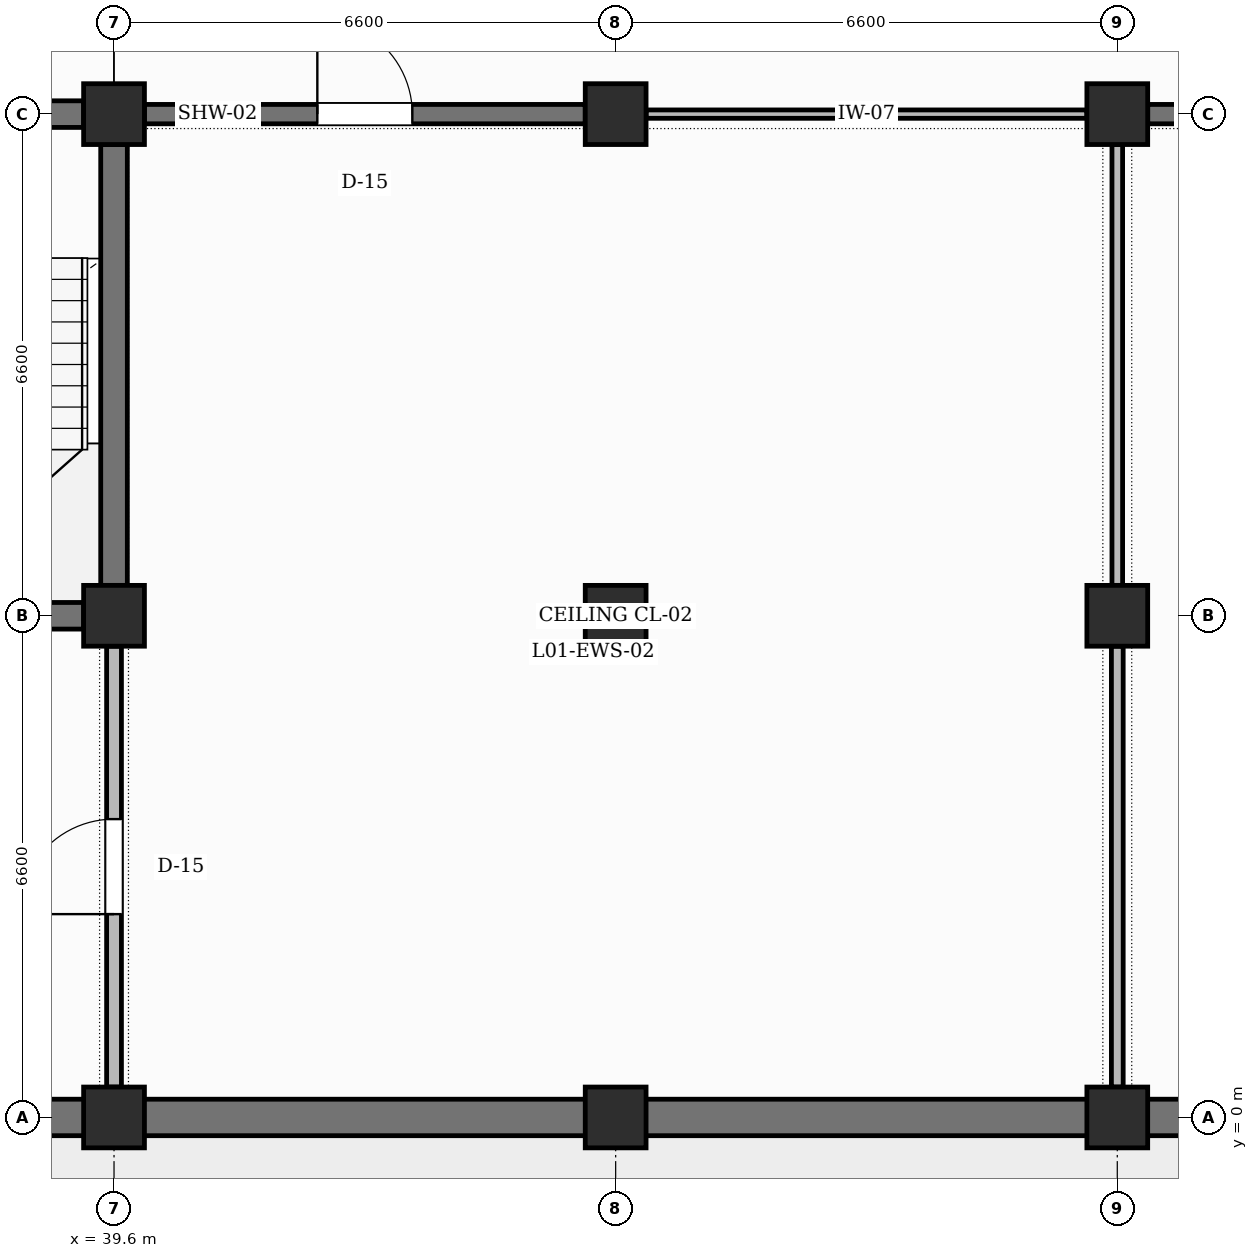
"""IFC4 building model, lengths in metres.
Left out: names, types, materials, properties, quantities, classifications, styles, units other than length and angle.
Written with IfcOpenShell. Run it as: python <this file> out.ifc"""

import sys

from ifc_helpers import new_model, si_unit, direction, frame, frame_2d, origin, origin_2d, place, context, subcontext, project, spatial, rectangle, extrude, element, fill, save


model = new_model("IFC4")
c1 = context("Model", 3, precision=1e-05, world=origin(), true_north=direction((0.0, 1.0)))
c2 = subcontext(c1, "Body", "Model", "MODEL_VIEW")
j1 = project(units=[si_unit("LENGTHUNIT", "METRE"), si_unit("PLANEANGLEUNIT", "RADIAN")], contexts=[c1])
p1 = place(None, origin())
s1 = spatial("IfcSite", under=j1, at=p1, CompositionType="ELEMENT")
p2 = place(p1, origin())
s2 = spatial("IfcBuilding", under=s1, at=p2, CompositionType="ELEMENT")
p3 = place(p2, frame((0.0, 0.0, 5.4)))
s3 = spatial("IfcBuildingStorey", under=s2, at=p3, CompositionType="ELEMENT", Elevation=5.4)
for number, where, z_axis, x_axis in (
    (1, (39.6, 0.0, 0.0), (0.0, 0.0, 1.0), (1.0, 0.0, 0.0)),
    (2, (39.6, 6.6, 0.0), (0.0, 0.0, 1.0), (1.0, 0.0, 0.0)),
    (3, (39.6, 13.2, 0.0), (0.0, 0.0, 1.0), (1.0, 0.0, 0.0)),
    (4, (46.2, 0.0, 0.0), (0.0, 0.0, 1.0), (1.0, 0.0, 0.0)),
    (5, (46.2, 6.6, 0.0), (0.0, 0.0, 1.0), (1.0, 0.0, 0.0)),
    (6, (46.2, 13.2, 0.0), (0.0, 0.0, 1.0), (1.0, 0.0, 0.0)),
    (7, (52.8, 0.0, 0.0), (0.0, 0.0, 1.0), (1.0, 0.0, 0.0)),
    (8, (52.8, 6.6, 0.0), (0.0, 0.0, 1.0), (1.0, 0.0, 0.0)),
    (9, (52.8, 13.2, 0.0), (0.0, 0.0, 1.0), (1.0, 0.0, 0.0)),
):
    element("IfcColumn", number, at=place(p3, frame(where, z_axis=z_axis, x_axis=x_axis)), inside=s3, PredefinedType="COLUMN", context=c2, shape_type="SweptSolid", body=[
        extrude(rectangle(XDim=0.8, YDim=0.8, at=origin_2d()), origin(), (0.0, 0.0, 1.0), 4.8),
    ])
p4 = place(p3, frame((33.425, 0.0, 0.0), z_axis=(0.0, 0.0, 1.0), x_axis=(1.0, 0.0, 0.0)))
e10 = element("IfcWall", 10, at=p4, inside=s3, PredefinedType="SOLIDWALL", context=c2, shape_type="SweptSolid", body=[
    extrude(rectangle(XDim=5.775, YDim=0.48, at=frame_2d((2.887, 0.0))), origin(), (0.0, 0.0, 1.0), 3.85),
])
p5 = place(p3, frame((40.0, 0.0, 0.0), z_axis=(0.0, 0.0, 1.0), x_axis=(1.0, 0.0, 0.0)))
e11 = element("IfcWall", 11, at=p5, inside=s3, PredefinedType="SOLIDWALL", context=c2, shape_type="SweptSolid", body=[
    extrude(rectangle(XDim=5.8, YDim=0.48, at=frame_2d((2.9, 0.0))), origin(), (0.0, 0.0, 1.0), 3.85),
])
p6 = place(p3, frame((46.6, 0.0, 0.0), z_axis=(0.0, 0.0, 1.0), x_axis=(1.0, 0.0, 0.0)))
e12 = element("IfcWall", 12, at=p6, inside=s3, PredefinedType="SOLIDWALL", context=c2, shape_type="SweptSolid", body=[
    extrude(rectangle(XDim=5.8, YDim=0.48, at=frame_2d((2.9, 0.0))), origin(), (0.0, 0.0, 1.0), 3.85),
])
p7 = place(p3, frame((53.2, 0.0, 0.0), z_axis=(0.0, 0.0, 1.0), x_axis=(1.0, 0.0, 0.0)))
e13 = element("IfcWall", 13, at=p7, inside=s3, PredefinedType="SOLIDWALL", context=c2, shape_type="SweptSolid", body=[
    extrude(rectangle(XDim=5.8, YDim=0.48, at=frame_2d((2.9, 0.0))), origin(), (0.0, 0.0, 1.0), 3.85),
])
p8 = place(p3, frame((33.425, 6.6, 0.0), z_axis=(0.0, 0.0, 1.0), x_axis=(1.0, 0.0, 0.0)))
e14 = element("IfcWall", 14, at=p8, inside=s3, PredefinedType="SHEAR", context=c2, shape_type="SweptSolid", body=[
    extrude(rectangle(XDim=5.775, YDim=0.35, at=frame_2d((2.887, 0.0))), origin(), (0.0, 0.0, 1.0), 3.6),
])
p9 = place(p3, frame((33.425, 13.2, 0.0), z_axis=(0.0, 0.0, 1.0), x_axis=(1.0, 0.0, 0.0)))
e15 = element("IfcWall", 15, at=p9, inside=s3, PredefinedType="SHEAR", context=c2, shape_type="SweptSolid", body=[
    extrude(rectangle(XDim=5.775, YDim=0.35, at=frame_2d((2.887, 0.0))), origin(), (0.0, 0.0, 1.0), 3.7),
])
p10 = place(p9, frame((2.337, 0.0, 0.0)))
e16 = element("IfcOpeningElement", 16, at=p10, cuts=e15, PredefinedType="OPENING", context=c2, shape_type="SweptSolid", body=[
    extrude(rectangle(XDim=1.1, YDim=2.15, at=frame_2d((0.55, 1.075))), frame((0.0, 0.185, 0.0), z_axis=(0.0, -1.0, 0.0), x_axis=(1.0, 0.0, 0.0)), (0.0, 0.0, 1.0), 0.37),
])
p11 = place(p3, frame((39.6, 7.0, 0.0), z_axis=(0.0, 0.0, 1.0), x_axis=(0.0, 1.0, 0.0)))
e17 = element("IfcWall", 17, at=p11, inside=s3, PredefinedType="SHEAR", context=c2, shape_type="SweptSolid", body=[
    extrude(rectangle(XDim=5.8, YDim=0.35, at=frame_2d((2.9, 0.0))), origin(), (0.0, 0.0, 1.0), 3.7),
])
p12 = place(p3, frame((39.6, 0.4, 0.0), z_axis=(0.0, 0.0, 1.0), x_axis=(0.0, 1.0, 0.0)))
e18 = element("IfcWall", 18, at=p12, inside=s3, PredefinedType="PARTITIONING", context=c2, shape_type="SweptSolid", body=[
    extrude(rectangle(XDim=5.8, YDim=0.195, at=frame_2d((2.9, 0.0))), origin(), (0.0, 0.0, 1.0), 3.7),
])
p13 = place(p12, frame((2.275, 0.0, 0.0)))
e19 = element("IfcOpeningElement", 19, at=p13, cuts=e18, PredefinedType="OPENING", context=c2, shape_type="SweptSolid", body=[
    extrude(rectangle(XDim=1.25, YDim=2.25, at=frame_2d((0.625, 1.125))), frame((0.0, 0.107, 0.0), z_axis=(0.0, -1.0, 0.0), x_axis=(1.0, 0.0, 0.0)), (0.0, 0.0, 1.0), 0.215),
])
p14 = place(p3, frame((40.0, 13.2, 0.0), z_axis=(0.0, 0.0, 1.0), x_axis=(1.0, 0.0, 0.0)))
e20 = element("IfcWall", 20, at=p14, inside=s3, PredefinedType="SHEAR", context=c2, shape_type="SweptSolid", body=[
    extrude(rectangle(XDim=5.8, YDim=0.255, at=frame_2d((2.9, 0.0))), origin(), (0.0, 0.0, 1.0), 3.6),
])
p15 = place(p14, frame((2.275, 0.0, 0.0)))
e21 = element("IfcOpeningElement", 21, at=p15, cuts=e20, PredefinedType="OPENING", context=c2, shape_type="SweptSolid", body=[
    extrude(rectangle(XDim=1.25, YDim=2.25, at=frame_2d((0.625, 1.125))), frame((0.0, 0.137, 0.0), z_axis=(0.0, -1.0, 0.0), x_axis=(1.0, 0.0, 0.0)), (0.0, 0.0, 1.0), 0.275),
])
p16 = place(p3, frame((52.8, 0.4, 0.0), z_axis=(0.0, 0.0, 1.0), x_axis=(0.0, 1.0, 0.0)))
e22 = element("IfcWall", 22, at=p16, inside=s3, PredefinedType="PARTITIONING", context=c2, shape_type="SweptSolid", body=[
    extrude(rectangle(XDim=5.8, YDim=0.155, at=frame_2d((2.9, 0.0))), origin(), (0.0, 0.0, 1.0), 3.7),
])
p17 = place(p3, frame((52.8, 7.0, 0.0), z_axis=(0.0, 0.0, 1.0), x_axis=(0.0, 1.0, 0.0)))
e23 = element("IfcWall", 23, at=p17, inside=s3, PredefinedType="PARTITIONING", context=c2, shape_type="SweptSolid", body=[
    extrude(rectangle(XDim=5.8, YDim=0.14, at=frame_2d((2.9, 0.0))), origin(), (0.0, 0.0, 1.0), 3.7),
])
p18 = place(p3, frame((46.6, 13.2, 0.0), z_axis=(0.0, 0.0, 1.0), x_axis=(1.0, 0.0, 0.0)))
e24 = element("IfcWall", 24, at=p18, inside=s3, PredefinedType="PARTITIONING", context=c2, shape_type="SweptSolid", body=[
    extrude(rectangle(XDim=5.8, YDim=0.11, at=frame_2d((2.9, 0.0))), origin(), (0.0, 0.0, 1.0), 3.7),
])
p19 = place(p3, frame((53.2, 13.2, 0.0), z_axis=(0.0, 0.0, 1.0), x_axis=(1.0, 0.0, 0.0)))
e25 = element("IfcWall", 25, at=p19, inside=s3, PredefinedType="SHEAR", context=c2, shape_type="SweptSolid", body=[
    extrude(rectangle(XDim=5.8, YDim=0.255, at=frame_2d((2.9, 0.0))), origin(), (0.0, 0.0, 1.0), 3.6),
])
p20 = place(p19, frame((2.175, 0.0, 0.0)))
e26 = element("IfcOpeningElement", 26, at=p20, cuts=e25, PredefinedType="OPENING", context=c2, shape_type="SweptSolid", body=[
    extrude(rectangle(XDim=1.45, YDim=2.25, at=frame_2d((0.725, 1.125))), frame((0.0, 0.137, 0.0), z_axis=(0.0, -1.0, 0.0), x_axis=(1.0, 0.0, 0.0)), (0.0, 0.0, 1.0), 0.275),
])
p21 = place(p15, origin())
e27 = element("IfcDoor", 27, at=p21, inside=s3, OperationType="SINGLE_SWING_LEFT", PredefinedType="DOOR", context=c2, shape_type="SweptSolid", body=[
    extrude(rectangle(XDim=1.25, YDim=2.25, at=frame_2d((0.625, 1.125))), frame((0.0, 0.025, 0.0), z_axis=(0.0, -1.0, 0.0), x_axis=(1.0, 0.0, 0.0)), (0.0, 0.0, 1.0), 0.05),
])
fill(e21, e27)
p22 = place(p13, origin())
e28 = element("IfcDoor", 28, at=p22, inside=s3, OperationType="SINGLE_SWING_LEFT", PredefinedType="DOOR", context=c2, shape_type="SweptSolid", body=[
    extrude(rectangle(XDim=1.25, YDim=2.25, at=frame_2d((0.625, 1.125))), frame((0.0, 0.025, 0.0), z_axis=(0.0, -1.0, 0.0), x_axis=(1.0, 0.0, 0.0)), (0.0, 0.0, 1.0), 0.05),
])
fill(e19, e28)
save(model, sys.argv[1])
